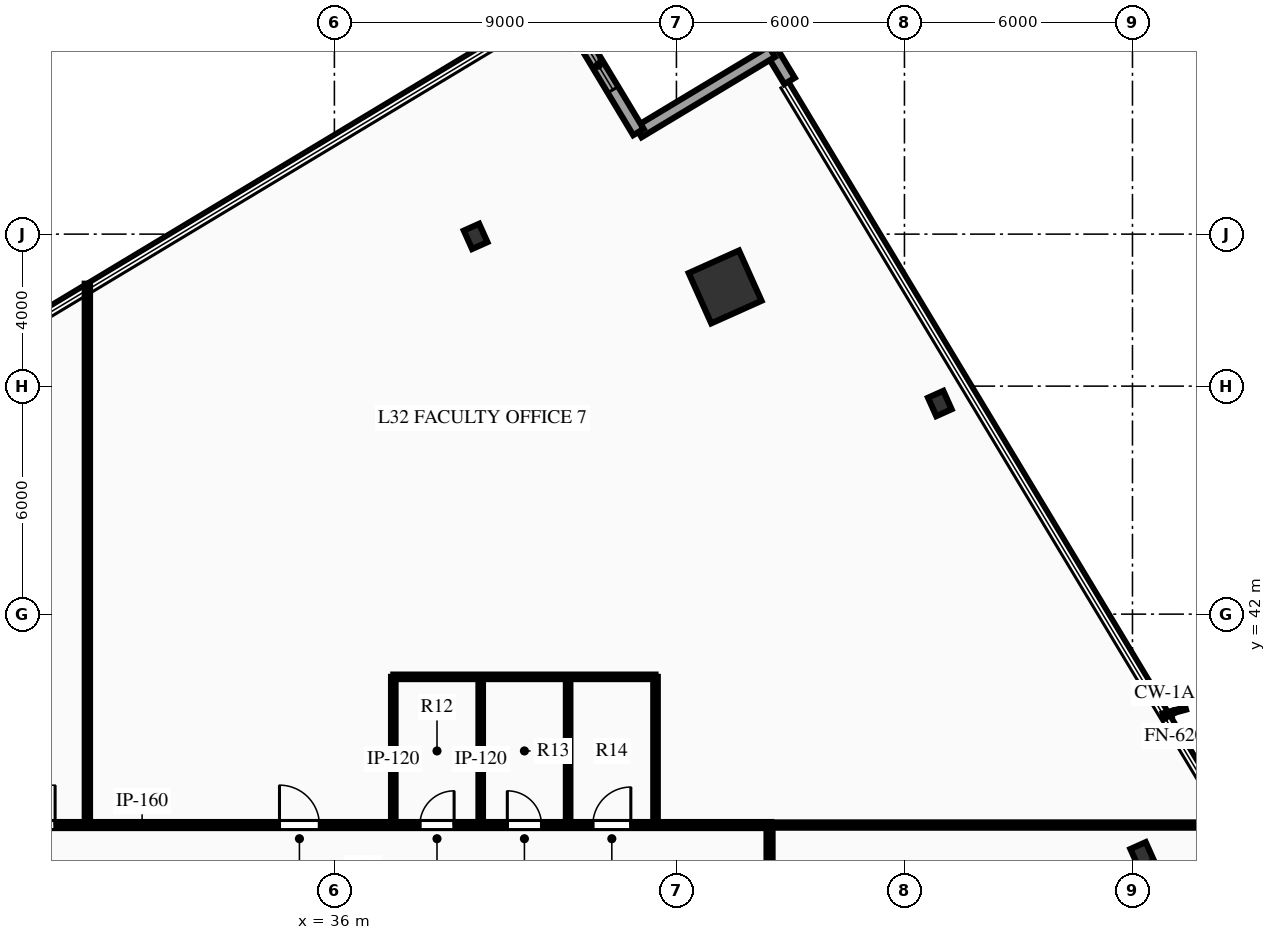
"""IFC4 building model, lengths in metres.
Left out: names, types, materials, properties, quantities, classifications, styles, units other than length and angle.
Written with IfcOpenShell. Run it as: python <this file> out.ifc"""

import sys

from ifc_helpers import new_model, si_unit, direction, frame, frame_2d, origin, origin_2d, place, context, subcontext, project, spatial, rectangle, hollow_rectangle, i_section, extrude, element, fill, save


model = new_model("IFC4")
c1 = context("Model", 3, precision=1e-05, world=origin(), true_north=direction((0.0, 1.0)))
c2 = subcontext(c1, "Body", "Model", "MODEL_VIEW")
j1 = project(units=[si_unit("LENGTHUNIT", "METRE"), si_unit("PLANEANGLEUNIT", "RADIAN")], contexts=[c1])
p1 = place(None, origin())
s1 = spatial("IfcSite", under=j1, at=p1, CompositionType="ELEMENT")
p2 = place(p1, origin())
s2 = spatial("IfcBuilding", under=s1, at=p2, CompositionType="ELEMENT")
p3 = place(p2, frame((0.0, 0.0, 131.7)))
s3 = spatial("IfcBuildingStorey", under=s2, at=p3, CompositionType="ELEMENT", Elevation=131.7)
p4 = place(p3, frame((46.281, 50.61, 0.0), z_axis=(0.0, 0.0, 1.0), x_axis=(0.912477494148, 0.409126902895, 0.0)))
e1 = element("IfcColumn", 1, at=p4, inside=s3, PredefinedType="COLUMN", context=c2, shape_type="SweptSolid", body=[
    extrude(hollow_rectangle(XDim=1.45, YDim=1.45, WallThickness=0.07, at=origin_2d()), origin(), (0.0, 0.0, 1.0), 4.5),
])
for number, where, z_axis, x_axis in (
    (2, (57.255, 35.667, 0.0), (0.0, 0.0, 1.0), (0.912, 0.409, 0.0)),
    (3, (51.93, 47.543, 0.0), (0.0, 0.0, 1.0), (0.912, 0.409, 0.0)),
    (4, (39.716, 51.941, 0.0), (0.0, 0.0, 1.0), (0.912, 0.409, 0.0)),
):
    element("IfcColumn", number, at=place(p3, frame(where, z_axis=z_axis, x_axis=x_axis)), inside=s3, PredefinedType="COLUMN", context=c2, shape_type="SweptSolid", body=[
        extrude(i_section(OverallWidth=0.442, OverallDepth=0.531, WebThickness=0.066, FlangeThickness=0.106, at=origin_2d()), origin(), (0.0, 0.0, 1.0), 4.5),
    ])
p5 = place(p3, frame((47.513, 56.802, 0.0), z_axis=(0.0, 0.0, 1.0), x_axis=(0.515732006809, -0.856749961863, 0.0)))
e5 = element("IfcWall", 5, at=p5, inside=s3, PredefinedType="STANDARD", context=c2, shape_type="SweptSolid", body=[
    extrude(rectangle(XDim=0.9, YDim=0.32, at=frame_2d((0.45, 0.0))), origin(), (0.0, 0.0, 1.0), 4.1),
])
p6 = place(p3, frame((44.0, 54.687, 0.0), z_axis=(0.0, 0.0, 1.0), x_axis=(0.856698589077, 0.515817339253, 0.0)))
e6 = element("IfcWall", 6, at=p6, inside=s3, PredefinedType="STANDARD", context=c2, shape_type="SweptSolid", body=[
    extrude(rectangle(XDim=4.1, YDim=0.32, at=frame_2d((2.05, 0.0))), origin(), (0.0, 0.0, 1.0), 4.1),
])
p7 = place(p3, frame((41.885, 58.199, 0.0), z_axis=(0.0, 0.0, 1.0), x_axis=(0.515729930739, -0.856751211578, 0.0)))
e7 = element("IfcWall", 7, at=p7, inside=s3, PredefinedType="STANDARD", context=c2, shape_type="SweptSolid", body=[
    extrude(rectangle(XDim=4.1, YDim=0.32, at=frame_2d((2.05, 0.0))), origin(), (0.0, 0.0, 1.0), 4.1),
])
p8 = place(p7, frame((1.3, 0.0, 0.85)))
e8 = element("IfcOpeningElement", 8, at=p8, cuts=e7, PredefinedType="OPENING", context=c2, shape_type="SweptSolid", body=[
    extrude(rectangle(XDim=1.5, YDim=2.1, at=frame_2d((0.75, 1.05))), frame((0.0, 0.17, 0.0), z_axis=(0.0, -1.0, 0.0), x_axis=(1.0, 0.0, 0.0)), (0.0, 0.0, 1.0), 0.34),
])
p9 = place(p3, frame((24.5, 36.45, 0.0), z_axis=(0.0, 0.0, 1.0), x_axis=(1.0, 0.0, 0.0)))
e9 = element("IfcWall", 9, at=p9, inside=s3, PredefinedType="PARTITIONING", context=c2, shape_type="SweptSolid", body=[
    extrude(rectangle(XDim=23.0, YDim=0.16, at=frame_2d((11.5, 0.0))), origin(), (0.0, 0.0, 1.0), 4.1),
])
p10 = place(p9, frame((13.75, 0.0, 0.0)))
e10 = element("IfcOpeningElement", 10, at=p10, cuts=e9, PredefinedType="OPENING", context=c2, shape_type="SweptSolid", body=[
    extrude(rectangle(XDim=0.9, YDim=2.15, at=frame_2d((0.45, 1.075))), frame((0.0, 0.09, 0.0), z_axis=(0.0, -1.0, 0.0), x_axis=(1.0, 0.0, 0.0)), (0.0, 0.0, 1.0), 0.18),
])
p11 = place(p9, frame((16.05, 0.0, 0.0)))
e11 = element("IfcOpeningElement", 11, at=p11, cuts=e9, PredefinedType="OPENING", context=c2, shape_type="SweptSolid", body=[
    extrude(rectangle(XDim=0.9, YDim=2.15, at=frame_2d((0.45, 1.075))), frame((0.0, 0.09, 0.0), z_axis=(0.0, -1.0, 0.0), x_axis=(1.0, 0.0, 0.0)), (0.0, 0.0, 1.0), 0.18),
])
p12 = place(p9, frame((18.3, 0.0, 0.0)))
e12 = element("IfcOpeningElement", 12, at=p12, cuts=e9, PredefinedType="OPENING", context=c2, shape_type="SweptSolid", body=[
    extrude(rectangle(XDim=1.0, YDim=2.15, at=frame_2d((0.5, 1.075))), frame((0.0, 0.09, 0.0), z_axis=(0.0, -1.0, 0.0), x_axis=(1.0, 0.0, 0.0)), (0.0, 0.0, 1.0), 0.18),
])
p13 = place(p9, frame((3.101, 0.0, 0.0)))
e13 = element("IfcOpeningElement", 13, at=p13, cuts=e9, PredefinedType="OPENING", context=c2, shape_type="SweptSolid", body=[
    extrude(rectangle(XDim=1.05, YDim=2.15, at=frame_2d((0.525, 1.075))), frame((0.0, 0.09, 0.0), z_axis=(0.0, -1.0, 0.0), x_axis=(1.0, 0.0, 0.0)), (0.0, 0.0, 1.0), 0.18),
])
p14 = place(p9, frame((10.055, 0.0, 0.0)))
e14 = element("IfcOpeningElement", 14, at=p14, cuts=e9, PredefinedType="OPENING", context=c2, shape_type="SweptSolid", body=[
    extrude(rectangle(XDim=1.05, YDim=2.15, at=frame_2d((0.525, 1.075))), frame((0.0, 0.09, 0.0), z_axis=(0.0, -1.0, 0.0), x_axis=(1.0, 0.0, 0.0)), (0.0, 0.0, 1.0), 0.18),
])
p15 = place(p3, frame((47.45, 15.55, 0.0), z_axis=(0.0, 0.0, 1.0), x_axis=(0.0, 1.0, 0.0)))
e15 = element("IfcWall", 15, at=p15, inside=s3, PredefinedType="PARTITIONING", context=c2, shape_type="SweptSolid", body=[
    extrude(rectangle(XDim=20.9, YDim=0.16, at=frame_2d((10.45, 0.0))), origin(), (0.0, 0.0, 1.0), 4.1),
])
p16 = place(p15, frame((7.417, 0.0, 0.0)))
e16 = element("IfcOpeningElement", 16, at=p16, cuts=e15, PredefinedType="OPENING", context=c2, shape_type="SweptSolid", body=[
    extrude(rectangle(XDim=1.05, YDim=2.15, at=frame_2d((0.525, 1.075))), frame((0.0, 0.09, 0.0), z_axis=(0.0, -1.0, 0.0), x_axis=(1.0, 0.0, 0.0)), (0.0, 0.0, 1.0), 0.18),
])
for number, where, z_axis, x_axis in (
    (17, (37.55, 36.45, 0.0), (0.0, 0.0, 1.0), (0.0, 1.0, 0.0)),
    (18, (39.85, 36.45, 0.0), (0.0, 0.0, 1.0), (0.0, 1.0, 0.0)),
    (19, (42.15, 36.45, 0.0), (0.0, 0.0, 1.0), (0.0, 1.0, 0.0)),
):
    element("IfcWall", number, at=place(p3, frame(where, z_axis=z_axis, x_axis=x_axis)), inside=s3, PredefinedType="PARTITIONING", context=c2, shape_type="SweptSolid", body=[
        extrude(rectangle(XDim=3.9, YDim=0.12, at=frame_2d((1.95, 0.0))), origin(), (0.0, 0.0, 1.0), 4.1),
    ])
p17 = place(p3, frame((44.45, 36.45, 0.0), z_axis=(0.0, 0.0, 1.0), x_axis=(0.0, 1.0, 0.0)))
e20 = element("IfcWall", 20, at=p17, inside=s3, PredefinedType="PARTITIONING", context=c2, shape_type="SweptSolid", body=[
    extrude(rectangle(XDim=3.9, YDim=0.12, at=frame_2d((1.95, 0.0))), origin(), (0.0, 0.0, 1.0), 2.595),
])
p18 = place(p3, frame((37.55, 40.35, 0.0), z_axis=(0.0, 0.0, 1.0), x_axis=(1.0, 0.0, 0.0)))
e21 = element("IfcWall", 21, at=p18, inside=s3, PredefinedType="PARTITIONING", context=c2, shape_type="SweptSolid", body=[
    extrude(rectangle(XDim=6.9, YDim=0.12, at=frame_2d((3.45, 0.0))), origin(), (0.0, 0.0, 1.0), 4.1),
])
p19 = place(p3, frame((47.45, 36.45, 0.0), z_axis=(0.0, 0.0, 1.0), x_axis=(1.0, 0.0, 0.0)))
e22 = element("IfcWall", 22, at=p19, inside=s3, PredefinedType="PARTITIONING", context=c2, shape_type="SweptSolid", body=[
    extrude(rectangle(XDim=12.269, YDim=0.14, at=frame_2d((6.134, 0.0))), origin(), (0.0, 0.0, 1.0), 4.1),
])
p20 = place(p3, frame((29.5, 36.45, 0.0), z_axis=(0.0, 0.0, 1.0), x_axis=(0.0, 1.0, 0.0)))
e23 = element("IfcWall", 23, at=p20, inside=s3, PredefinedType="PARTITIONING", context=c2, shape_type="SweptSolid", body=[
    extrude(rectangle(XDim=14.246, YDim=0.14, at=frame_2d((7.123, 0.0))), origin(), (0.0, 0.0, 1.0), 4.1),
])
p21 = place(p8, origin())
e24 = element("IfcWindow", 24, at=p21, inside=s3, PartitioningType="SINGLE_PANEL", PredefinedType="WINDOW", context=c2, shape_type="SweptSolid", body=[
    extrude(rectangle(XDim=1.5, YDim=2.1, at=frame_2d((0.75, 1.05))), frame((0.0, 0.03, 0.0), z_axis=(0.0, -1.0, 0.0), x_axis=(1.0, 0.0, 0.0)), (0.0, 0.0, 1.0), 0.06),
])
fill(e8, e24)
p22 = place(p10, origin())
e25 = element("IfcDoor", 25, at=p22, inside=s3, OperationType="SINGLE_SWING_RIGHT", PredefinedType="DOOR", context=c2, shape_type="SweptSolid", body=[
    extrude(rectangle(XDim=0.9, YDim=2.15, at=frame_2d((0.45, 1.075))), frame((0.0, 0.025, 0.0), z_axis=(0.0, -1.0, 0.0), x_axis=(1.0, 0.0, 0.0)), (0.0, 0.0, 1.0), 0.05),
])
fill(e10, e25)
p23 = place(p11, origin())
e26 = element("IfcDoor", 26, at=p23, inside=s3, OperationType="SINGLE_SWING_LEFT", PredefinedType="DOOR", context=c2, shape_type="SweptSolid", body=[
    extrude(rectangle(XDim=0.9, YDim=2.15, at=frame_2d((0.45, 1.075))), frame((0.0, 0.025, 0.0), z_axis=(0.0, -1.0, 0.0), x_axis=(1.0, 0.0, 0.0)), (0.0, 0.0, 1.0), 0.05),
])
fill(e11, e26)
p24 = place(p12, origin())
e27 = element("IfcDoor", 27, at=p24, inside=s3, OperationType="SINGLE_SWING_RIGHT", PredefinedType="DOOR", context=c2, shape_type="SweptSolid", body=[
    extrude(rectangle(XDim=1.0, YDim=2.15, at=frame_2d((0.5, 1.075))), frame((0.0, 0.025, 0.0), z_axis=(0.0, -1.0, 0.0), x_axis=(1.0, 0.0, 0.0)), (0.0, 0.0, 1.0), 0.05),
])
fill(e12, e27)
p25 = place(p13, origin())
e28 = element("IfcDoor", 28, at=p25, inside=s3, OperationType="SINGLE_SWING_RIGHT", PredefinedType="DOOR", context=c2, shape_type="SweptSolid", body=[
    extrude(rectangle(XDim=1.05, YDim=2.15, at=frame_2d((0.525, 1.075))), frame((0.0, 0.025, 0.0), z_axis=(0.0, -1.0, 0.0), x_axis=(1.0, 0.0, 0.0)), (0.0, 0.0, 1.0), 0.05),
])
fill(e13, e28)
p26 = place(p14, origin())
e29 = element("IfcDoor", 29, at=p26, inside=s3, OperationType="SINGLE_SWING_LEFT", PredefinedType="DOOR", context=c2, shape_type="SweptSolid", body=[
    extrude(rectangle(XDim=1.05, YDim=2.15, at=frame_2d((0.525, 1.075))), frame((0.0, 0.025, 0.0), z_axis=(0.0, -1.0, 0.0), x_axis=(1.0, 0.0, 0.0)), (0.0, 0.0, 1.0), 0.05),
])
fill(e14, e29)
save(model, sys.argv[1])
